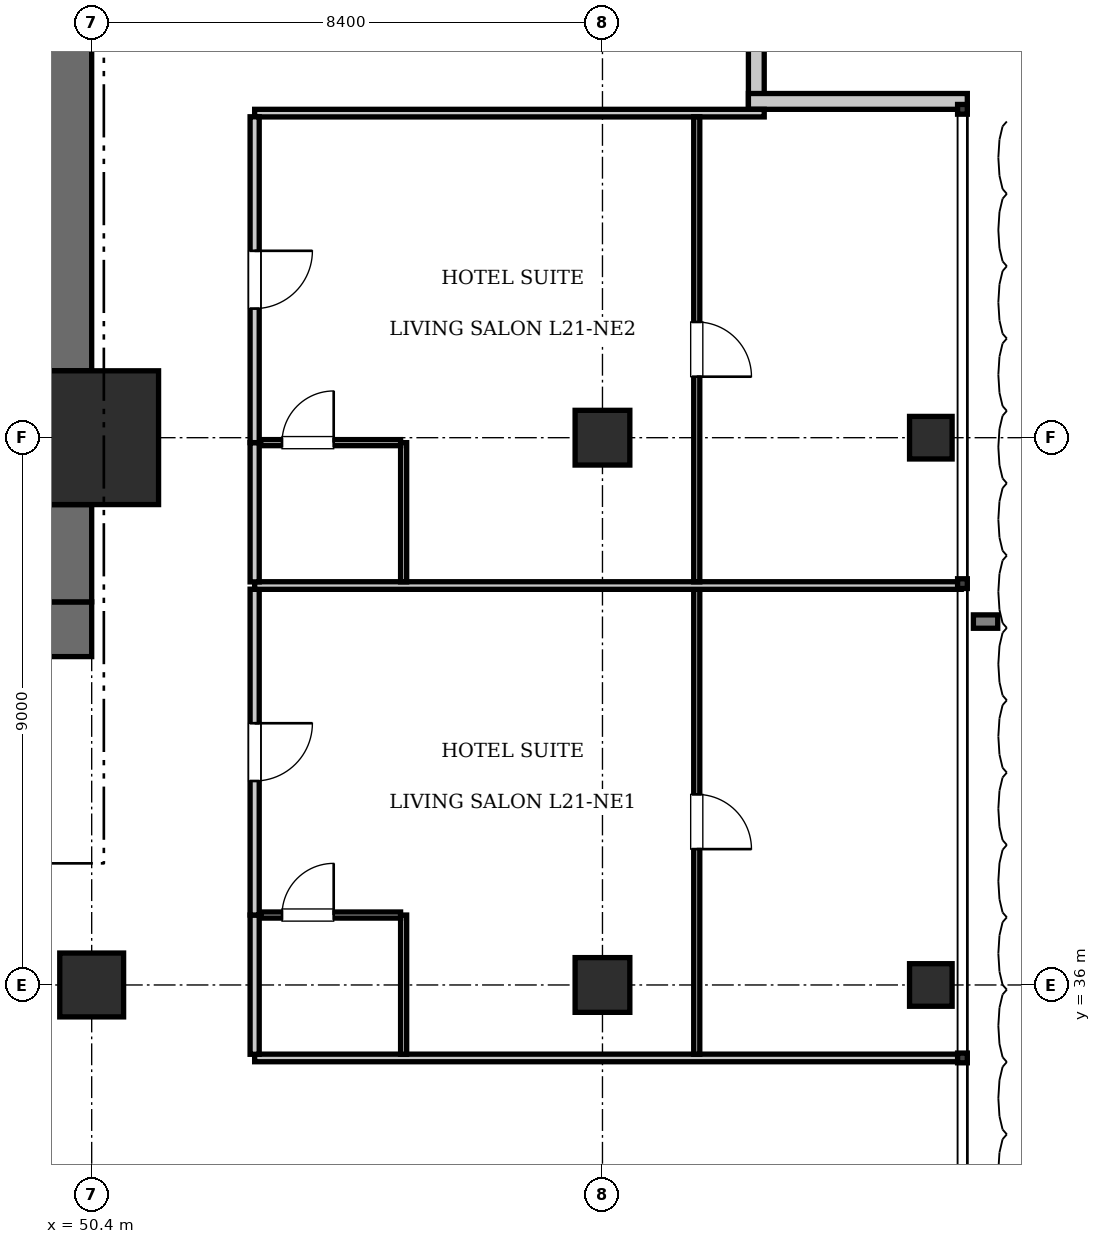
"""IFC4 building model, lengths in metres.
Left out: names, types, materials, properties, quantities, classifications, styles, units other than length and angle.
Written with IfcOpenShell. Run it as: python <this file> out.ifc"""

import sys

from ifc_helpers import new_model, si_unit, direction, frame, frame_2d, origin, origin_2d, place, context, subcontext, project, spatial, rectangle, i_section, extrude, element, fill, save


model = new_model("IFC4")
c1 = context("Model", 3, precision=1e-05, world=origin(), true_north=direction((0.0, 1.0)))
c2 = subcontext(c1, "Body", "Model", "MODEL_VIEW")
j1 = project(units=[si_unit("LENGTHUNIT", "METRE"), si_unit("PLANEANGLEUNIT", "RADIAN")], contexts=[c1])
p1 = place(None, origin())
s1 = spatial("IfcSite", under=j1, at=p1, CompositionType="ELEMENT")
p2 = place(p1, origin())
s2 = spatial("IfcBuilding", under=s1, at=p2, CompositionType="ELEMENT")
p3 = place(p2, frame((0.0, 0.0, 88.55)))
s3 = spatial("IfcBuildingStorey", under=s2, at=p3, CompositionType="ELEMENT", Elevation=88.55)
p4 = place(p3, frame((50.4, 45.0, 0.0), z_axis=(0.0, 0.0, 1.0), x_axis=(1.0, 0.0, 0.0)))
e1 = element("IfcColumn", 1, at=p4, inside=s3, PredefinedType="COLUMN", context=c2, shape_type="SweptSolid", body=[
    extrude(rectangle(XDim=2.2, YDim=2.2, at=origin_2d()), origin(), (0.0, 0.0, 1.0), 3.85),
])
p5 = place(p3, frame((43.6, 41.85, 0.0), z_axis=(0.0, 0.0, 1.0), x_axis=(1.0, 0.0, 0.0)))
e2 = element("IfcWall", 2, at=p5, inside=s3, PredefinedType="SHEAR", context=c2, shape_type="SweptSolid", body=[
    extrude(rectangle(XDim=6.8, YDim=0.9, at=frame_2d((3.4, 0.0))), origin(), (0.0, 0.0, 1.0), 3.85),
])
p6 = place(p5, frame((3.9, 0.0, 0.0)))
e3 = element("IfcOpeningElement", 3, at=p6, cuts=e2, PredefinedType="OPENING", context=c2, shape_type="SweptSolid", body=[
    extrude(rectangle(XDim=1.15, YDim=2.15, at=frame_2d((0.575, 1.075))), frame((0.0, 0.46, 0.0), z_axis=(0.0, -1.0, 0.0), x_axis=(1.0, 0.0, 0.0)), (0.0, 0.0, 1.0), 0.92),
])
p7 = place(p5, frame((0.55, 0.0, 0.0)))
e4 = element("IfcOpeningElement", 4, at=p7, cuts=e2, PredefinedType="OPENING", context=c2, shape_type="SweptSolid", body=[
    extrude(rectangle(XDim=1.1, YDim=2.2, at=frame_2d((0.55, 1.1))), frame((0.0, 0.46, 0.0), z_axis=(0.0, -1.0, 0.0), x_axis=(1.0, 0.0, 0.0)), (0.0, 0.0, 1.0), 0.92),
])
p8 = place(p3, frame((49.95, 42.3, 0.0), z_axis=(0.0, 0.0, 1.0), x_axis=(0.0, 1.0, 0.0)))
e5 = element("IfcWall", 5, at=p8, inside=s3, PredefinedType="SHEAR", context=c2, shape_type="SweptSolid", body=[
    extrude(rectangle(XDim=1.6, YDim=0.9, at=frame_2d((0.8, 0.0))), origin(), (0.0, 0.0, 1.0), 3.85),
])
p9 = place(p3, frame((49.95, 46.1, 0.0), z_axis=(0.0, 0.0, 1.0), x_axis=(0.0, 1.0, 0.0)))
e6 = element("IfcWall", 6, at=p9, inside=s3, PredefinedType="SHEAR", context=c2, shape_type="SweptSolid", body=[
    extrude(rectangle(XDim=7.0, YDim=0.9, at=frame_2d((3.5, 0.0))), origin(), (0.0, 0.0, 1.0), 3.85),
])
p10 = place(p3, frame((50.4, 36.0, 0.0), z_axis=(0.0, 0.0, 1.0), x_axis=(1.0, 0.0, 0.0)))
e7 = element("IfcColumn", 7, at=p10, inside=s3, PredefinedType="COLUMN", context=c2, shape_type="SweptSolid", body=[
    extrude(rectangle(XDim=1.05, YDim=1.05, at=origin_2d()), origin(), (0.0, 0.0, 1.0), 3.85),
])
for number, where, z_axis, x_axis in (
    (8, (58.8, 36.0, 0.0), (0.0, 0.0, 1.0), (1.0, 0.0, 0.0)),
    (9, (58.8, 45.0, 0.0), (0.0, 0.0, 1.0), (1.0, 0.0, 0.0)),
):
    element("IfcColumn", number, at=place(p3, frame(where, z_axis=z_axis, x_axis=x_axis)), inside=s3, PredefinedType="COLUMN", context=c2, shape_type="SweptSolid", body=[
        extrude(rectangle(XDim=0.9, YDim=0.9, at=origin_2d()), origin(), (0.0, 0.0, 1.0), 3.85),
    ])
for number, where, z_axis, x_axis in (
    (10, (64.2, 36.0, 0.0), (0.0, 0.0, 1.0), (1.0, 0.0, 0.0)),
    (11, (64.2, 45.0, 0.0), (0.0, 0.0, 1.0), (1.0, 0.0, 0.0)),
):
    element("IfcColumn", number, at=place(p3, frame(where, z_axis=z_axis, x_axis=x_axis)), inside=s3, PredefinedType="COLUMN", context=c2, shape_type="SweptSolid", body=[
        extrude(i_section(OverallWidth=0.7, OverallDepth=0.7, WebThickness=0.028, FlangeThickness=0.044, at=origin_2d()), origin(), (0.0, 0.0, 1.0), 3.85),
    ])
for number, where, z_axis, x_axis in (
    (12, (61.33, 54.0, 0.0), (0.0, 0.0, 1.0), (0.0, -1.0, 0.0)),
    (13, (61.2, 50.53, 0.0), (0.0, 0.0, 1.0), (1.0, 0.0, 0.0)),
):
    element("IfcWall", number, at=place(p3, frame(where, z_axis=z_axis, x_axis=x_axis)), inside=s3, PredefinedType="SOLIDWALL", context=c2, shape_type="SweptSolid", body=[
        extrude(rectangle(XDim=3.6, YDim=0.26, at=frame_2d((1.8, 0.0))), origin(), (0.0, 0.0, 1.0), 3.61),
    ])
p11 = place(p3, frame((53.08, 34.8, 0.0), z_axis=(0.0, 0.0, 1.0), x_axis=(1.0, 0.0, 0.0)))
e14 = element("IfcWall", 14, at=p11, inside=s3, PredefinedType="PARTITIONING", context=c2, shape_type="SweptSolid", body=[
    extrude(rectangle(XDim=11.62, YDim=0.125, at=frame_2d((5.81, 0.0))), origin(), (0.0, 0.0, 1.0), 3.61),
])
p12 = place(p3, frame((53.08, 50.337, 0.0), z_axis=(0.0, 0.0, 1.0), x_axis=(1.0, 0.0, 0.0)))
e15 = element("IfcWall", 15, at=p12, inside=s3, PredefinedType="PARTITIONING", context=c2, shape_type="SweptSolid", body=[
    extrude(rectangle(XDim=8.38, YDim=0.125, at=frame_2d((4.19, 0.0))), origin(), (0.0, 0.0, 1.0), 3.61),
])
p13 = place(p3, frame((53.08, 34.86, 0.0), z_axis=(0.0, 0.0, 1.0), x_axis=(0.0, 1.0, 0.0)))
e16 = element("IfcWall", 16, at=p13, inside=s3, PredefinedType="PARTITIONING", context=c2, shape_type="SweptSolid", body=[
    extrude(rectangle(XDim=2.29, YDim=0.15, at=frame_2d((1.145, 0.0))), origin(), (0.0, 0.0, 1.0), 3.61),
])
p14 = place(p3, frame((53.08, 37.15, 0.0), z_axis=(0.0, 0.0, 1.0), x_axis=(0.0, 1.0, 0.0)))
e17 = element("IfcWall", 17, at=p14, inside=s3, PredefinedType="PARTITIONING", context=c2, shape_type="SweptSolid", body=[
    extrude(rectangle(XDim=5.359, YDim=0.15, at=frame_2d((2.679, 0.0))), origin(), (0.0, 0.0, 1.0), 3.61),
])
p15 = place(p14, frame((2.204, 0.0, 0.0)))
e18 = element("IfcOpeningElement", 18, at=p15, cuts=e17, PredefinedType="OPENING", context=c2, shape_type="SweptSolid", body=[
    extrude(rectangle(XDim=0.95, YDim=2.15, at=frame_2d((0.475, 1.075))), frame((0.0, 0.085, 0.0), z_axis=(0.0, -1.0, 0.0), x_axis=(1.0, 0.0, 0.0)), (0.0, 0.0, 1.0), 0.17),
])
p16 = place(p3, frame((55.53, 34.86, 0.0), z_axis=(0.0, 0.0, 1.0), x_axis=(0.0, 1.0, 0.0)))
e19 = element("IfcWall", 19, at=p16, inside=s3, PredefinedType="PARTITIONING", context=c2, shape_type="SweptSolid", body=[
    extrude(rectangle(XDim=2.29, YDim=0.1, at=frame_2d((1.145, 0.0))), origin(), (0.0, 0.0, 1.0), 3.61),
])
p17 = place(p3, frame((53.18, 37.15, 0.0), z_axis=(0.0, 0.0, 1.0), x_axis=(1.0, 0.0, 0.0)))
e20 = element("IfcWall", 20, at=p17, inside=s3, PredefinedType="PARTITIONING", context=c2, shape_type="SweptSolid", body=[
    extrude(rectangle(XDim=2.3, YDim=0.1, at=frame_2d((1.15, 0.0))), origin(), (0.0, 0.0, 1.0), 3.61),
])
p18 = place(p17, frame((0.35, 0.0, 0.0)))
e21 = element("IfcOpeningElement", 21, at=p18, cuts=e20, PredefinedType="OPENING", context=c2, shape_type="SweptSolid", body=[
    extrude(rectangle(XDim=0.85, YDim=2.1, at=frame_2d((0.425, 1.05))), frame((0.0, 0.06, 0.0), z_axis=(0.0, -1.0, 0.0), x_axis=(1.0, 0.0, 0.0)), (0.0, 0.0, 1.0), 0.12),
])
p19 = place(p3, frame((60.35, 34.86, 0.0), z_axis=(0.0, 0.0, 1.0), x_axis=(0.0, 1.0, 0.0)))
e22 = element("IfcWall", 22, at=p19, inside=s3, PredefinedType="PARTITIONING", context=c2, shape_type="SweptSolid", body=[
    extrude(rectangle(XDim=7.649, YDim=0.1, at=frame_2d((3.824, 0.0))), origin(), (0.0, 0.0, 1.0), 3.61),
])
p20 = place(p19, frame((3.374, 0.0, 0.0)))
e23 = element("IfcOpeningElement", 23, at=p20, cuts=e22, PredefinedType="OPENING", context=c2, shape_type="SweptSolid", body=[
    extrude(rectangle(XDim=0.9, YDim=2.1, at=frame_2d((0.45, 1.05))), frame((0.0, 0.06, 0.0), z_axis=(0.0, -1.0, 0.0), x_axis=(1.0, 0.0, 0.0)), (0.0, 0.0, 1.0), 0.12),
])
p21 = place(p3, frame((53.08, 42.569, 0.0), z_axis=(0.0, 0.0, 1.0), x_axis=(1.0, 0.0, 0.0)))
e24 = element("IfcWall", 24, at=p21, inside=s3, PredefinedType="PARTITIONING", context=c2, shape_type="SweptSolid", body=[
    extrude(rectangle(XDim=11.62, YDim=0.125, at=frame_2d((5.81, 0.0))), origin(), (0.0, 0.0, 1.0), 3.61),
])
p22 = place(p3, frame((53.08, 42.629, 0.0), z_axis=(0.0, 0.0, 1.0), x_axis=(0.0, 1.0, 0.0)))
e25 = element("IfcWall", 25, at=p22, inside=s3, PredefinedType="PARTITIONING", context=c2, shape_type="SweptSolid", body=[
    extrude(rectangle(XDim=2.29, YDim=0.15, at=frame_2d((1.145, 0.0))), origin(), (0.0, 0.0, 1.0), 3.61),
])
p23 = place(p3, frame((53.08, 44.919, 0.0), z_axis=(0.0, 0.0, 1.0), x_axis=(0.0, 1.0, 0.0)))
e26 = element("IfcWall", 26, at=p23, inside=s3, PredefinedType="PARTITIONING", context=c2, shape_type="SweptSolid", body=[
    extrude(rectangle(XDim=5.359, YDim=0.15, at=frame_2d((2.679, 0.0))), origin(), (0.0, 0.0, 1.0), 3.61),
])
p24 = place(p23, frame((2.204, 0.0, 0.0)))
e27 = element("IfcOpeningElement", 27, at=p24, cuts=e26, PredefinedType="OPENING", context=c2, shape_type="SweptSolid", body=[
    extrude(rectangle(XDim=0.95, YDim=2.15, at=frame_2d((0.475, 1.075))), frame((0.0, 0.085, 0.0), z_axis=(0.0, -1.0, 0.0), x_axis=(1.0, 0.0, 0.0)), (0.0, 0.0, 1.0), 0.17),
])
p25 = place(p3, frame((55.53, 42.629, 0.0), z_axis=(0.0, 0.0, 1.0), x_axis=(0.0, 1.0, 0.0)))
e28 = element("IfcWall", 28, at=p25, inside=s3, PredefinedType="PARTITIONING", context=c2, shape_type="SweptSolid", body=[
    extrude(rectangle(XDim=2.29, YDim=0.1, at=frame_2d((1.145, 0.0))), origin(), (0.0, 0.0, 1.0), 3.61),
])
p26 = place(p3, frame((53.18, 44.919, 0.0), z_axis=(0.0, 0.0, 1.0), x_axis=(1.0, 0.0, 0.0)))
e29 = element("IfcWall", 29, at=p26, inside=s3, PredefinedType="PARTITIONING", context=c2, shape_type="SweptSolid", body=[
    extrude(rectangle(XDim=2.3, YDim=0.1, at=frame_2d((1.15, 0.0))), origin(), (0.0, 0.0, 1.0), 2.999),
])
p27 = place(p26, frame((0.35, 0.0, 0.0)))
e30 = element("IfcOpeningElement", 30, at=p27, cuts=e29, PredefinedType="OPENING", context=c2, shape_type="SweptSolid", body=[
    extrude(rectangle(XDim=0.85, YDim=2.1, at=frame_2d((0.425, 1.05))), frame((0.0, 0.06, 0.0), z_axis=(0.0, -1.0, 0.0), x_axis=(1.0, 0.0, 0.0)), (0.0, 0.0, 1.0), 0.12),
])
p28 = place(p3, frame((60.35, 42.629, 0.0), z_axis=(0.0, 0.0, 1.0), x_axis=(0.0, 1.0, 0.0)))
e31 = element("IfcWall", 31, at=p28, inside=s3, PredefinedType="PARTITIONING", context=c2, shape_type="SweptSolid", body=[
    extrude(rectangle(XDim=7.649, YDim=0.1, at=frame_2d((3.824, 0.0))), origin(), (0.0, 0.0, 1.0), 3.61),
])
p29 = place(p28, frame((3.375, 0.0, 0.0)))
e32 = element("IfcOpeningElement", 32, at=p29, cuts=e31, PredefinedType="OPENING", context=c2, shape_type="SweptSolid", body=[
    extrude(rectangle(XDim=0.9, YDim=2.1, at=frame_2d((0.45, 1.05))), frame((0.0, 0.06, 0.0), z_axis=(0.0, -1.0, 0.0), x_axis=(1.0, 0.0, 0.0)), (0.0, 0.0, 1.0), 0.12),
])
p30 = place(p18, origin())
e33 = element("IfcDoor", 33, at=p30, inside=s3, OperationType="SINGLE_SWING_RIGHT", PredefinedType="DOOR", context=c2, shape_type="SweptSolid", body=[
    extrude(rectangle(XDim=0.85, YDim=2.1, at=frame_2d((0.425, 1.05))), frame((0.0, 0.025, 0.0), z_axis=(0.0, -1.0, 0.0), x_axis=(1.0, 0.0, 0.0)), (0.0, 0.0, 1.0), 0.05),
])
fill(e21, e33)
p31 = place(p15, frame((0.95, 0.0, 0.0), z_axis=(0.0, 0.0, 1.0), x_axis=(-1.0, 0.0, 0.0)))
e34 = element("IfcDoor", 34, at=p31, inside=s3, OperationType="SINGLE_SWING_LEFT", PredefinedType="DOOR", context=c2, shape_type="SweptSolid", body=[
    extrude(rectangle(XDim=0.95, YDim=2.15, at=frame_2d((0.475, 1.075))), frame((0.0, 0.025, 0.0), z_axis=(0.0, -1.0, 0.0), x_axis=(1.0, 0.0, 0.0)), (0.0, 0.0, 1.0), 0.05),
])
fill(e18, e34)
p32 = place(p20, frame((0.9, 0.0, 0.0), z_axis=(0.0, 0.0, 1.0), x_axis=(-1.0, 0.0, 0.0)))
e35 = element("IfcDoor", 35, at=p32, inside=s3, OperationType="SINGLE_SWING_RIGHT", PredefinedType="DOOR", context=c2, shape_type="SweptSolid", body=[
    extrude(rectangle(XDim=0.9, YDim=2.1, at=frame_2d((0.45, 1.05))), frame((0.0, 0.025, 0.0), z_axis=(0.0, -1.0, 0.0), x_axis=(1.0, 0.0, 0.0)), (0.0, 0.0, 1.0), 0.05),
])
fill(e23, e35)
p33 = place(p27, origin())
e36 = element("IfcDoor", 36, at=p33, inside=s3, OperationType="SINGLE_SWING_RIGHT", PredefinedType="DOOR", context=c2, shape_type="SweptSolid", body=[
    extrude(rectangle(XDim=0.85, YDim=2.1, at=frame_2d((0.425, 1.05))), frame((0.0, 0.025, 0.0), z_axis=(0.0, -1.0, 0.0), x_axis=(1.0, 0.0, 0.0)), (0.0, 0.0, 1.0), 0.05),
])
fill(e30, e36)
p34 = place(p24, frame((0.95, 0.0, 0.0), z_axis=(0.0, 0.0, 1.0), x_axis=(-1.0, 0.0, 0.0)))
e37 = element("IfcDoor", 37, at=p34, inside=s3, OperationType="SINGLE_SWING_LEFT", PredefinedType="DOOR", context=c2, shape_type="SweptSolid", body=[
    extrude(rectangle(XDim=0.95, YDim=2.15, at=frame_2d((0.475, 1.075))), frame((0.0, 0.025, 0.0), z_axis=(0.0, -1.0, 0.0), x_axis=(1.0, 0.0, 0.0)), (0.0, 0.0, 1.0), 0.05),
])
fill(e27, e37)
p35 = place(p29, frame((0.9, 0.0, 0.0), z_axis=(0.0, 0.0, 1.0), x_axis=(-1.0, 0.0, 0.0)))
e38 = element("IfcDoor", 38, at=p35, inside=s3, OperationType="SINGLE_SWING_RIGHT", PredefinedType="DOOR", context=c2, shape_type="SweptSolid", body=[
    extrude(rectangle(XDim=0.9, YDim=2.1, at=frame_2d((0.45, 1.05))), frame((0.0, 0.025, 0.0), z_axis=(0.0, -1.0, 0.0), x_axis=(1.0, 0.0, 0.0)), (0.0, 0.0, 1.0), 0.05),
])
fill(e32, e38)
save(model, sys.argv[1])
